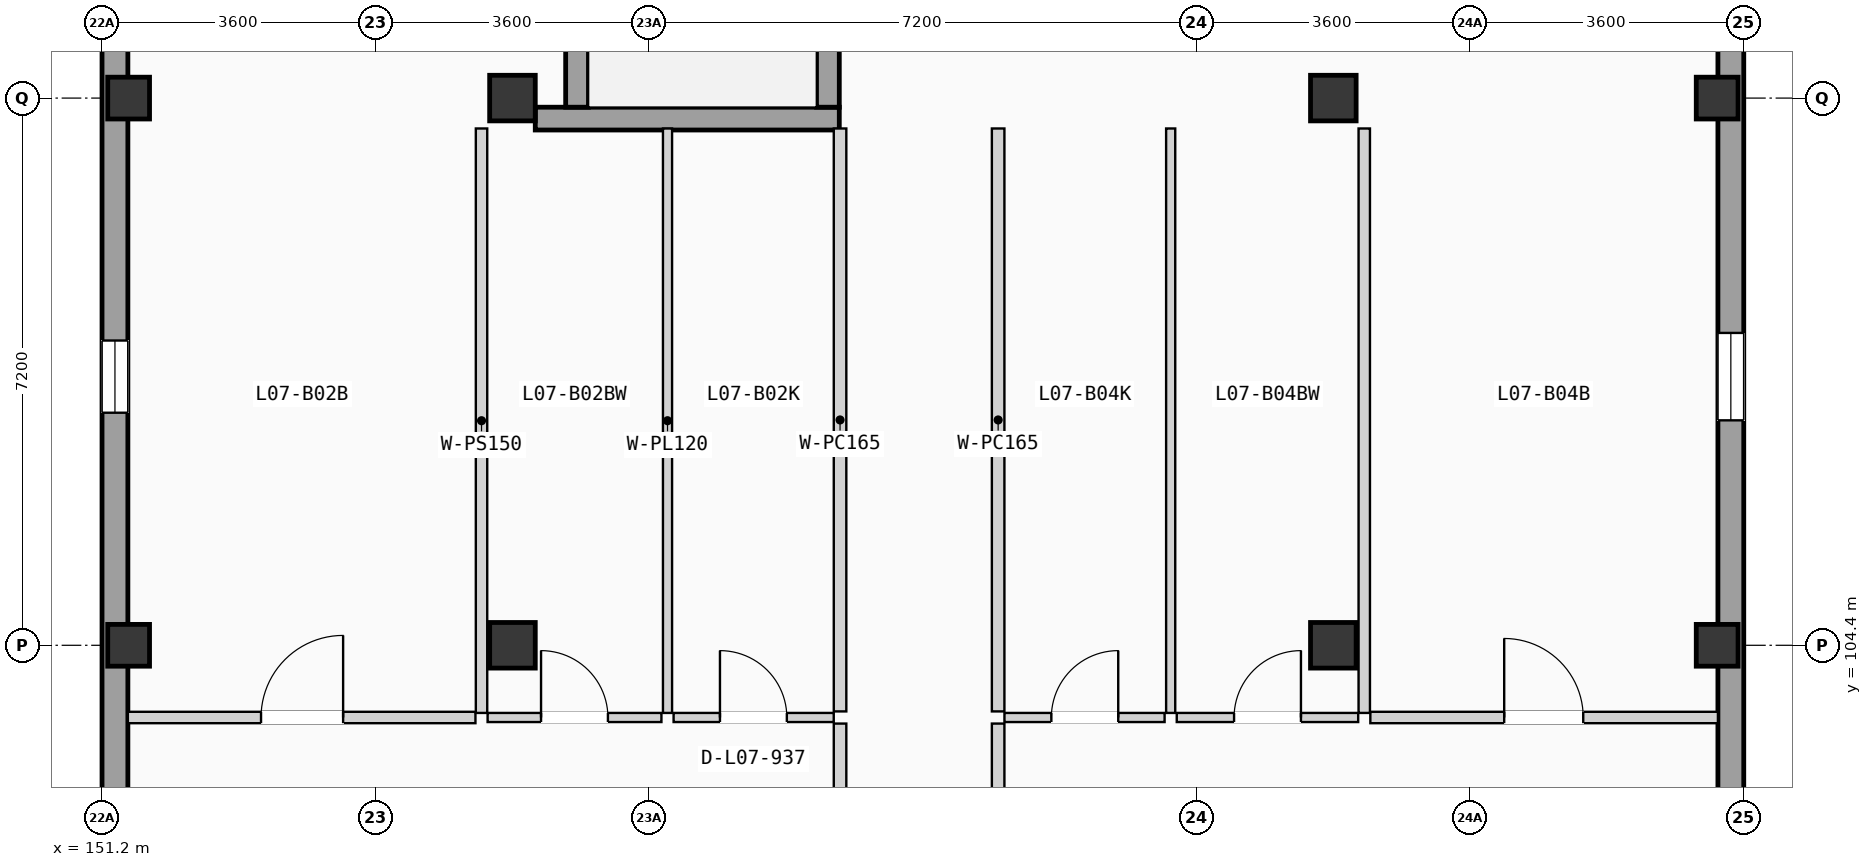
"""IFC4 building model, lengths in metres.
Left out: names, types, materials, properties, quantities, classifications, styles, units other than length and angle.
Written with IfcOpenShell. Run it as: python <this file> out.ifc"""

import sys

from ifc_helpers import new_model, si_unit, direction, frame, frame_2d, origin, origin_2d, place, context, subcontext, project, spatial, rectangle, extrude, element, fill, save


model = new_model("IFC4")
c1 = context("Model", 3, precision=1e-05, world=origin(), true_north=direction((0.0, 1.0)))
c2 = subcontext(c1, "Body", "Model", "MODEL_VIEW")
j1 = project(units=[si_unit("LENGTHUNIT", "METRE"), si_unit("PLANEANGLEUNIT", "RADIAN")], contexts=[c1])
p1 = place(None, origin())
s1 = spatial("IfcSite", under=j1, at=p1, CompositionType="ELEMENT")
p2 = place(p1, origin())
s2 = spatial("IfcBuilding", under=s1, at=p2, CompositionType="ELEMENT")
p3 = place(p2, frame((0.0, 0.0, 24.675)))
s3 = spatial("IfcBuildingStorey", under=s2, at=p3, CompositionType="ELEMENT", Elevation=24.675)
for number, where, z_axis, x_axis in (
    (1, (151.55, 104.4, 0.0), (0.0, 0.0, 1.0), (1.0, 0.0, 0.0)),
    (2, (151.55, 111.6, 0.0), (0.0, 0.0, 1.0), (1.0, 0.0, 0.0)),
):
    element("IfcColumn", number, at=place(p3, frame(where, z_axis=z_axis, x_axis=x_axis)), inside=s3, PredefinedType="COLUMN", context=c2, shape_type="SweptSolid", body=[
        extrude(rectangle(XDim=0.55, YDim=0.55, at=origin_2d()), origin(), (0.0, 0.0, 1.0), 3.15),
    ])
for number, where, z_axis, x_axis in (
    (3, (156.6, 104.4, 0.0), (0.0, 0.0, 1.0), (1.0, 0.0, 0.0)),
    (4, (156.6, 111.6, 0.0), (0.0, 0.0, 1.0), (1.0, 0.0, 0.0)),
    (5, (167.4, 104.4, 0.0), (0.0, 0.0, 1.0), (1.0, 0.0, 0.0)),
    (6, (167.4, 111.6, 0.0), (0.0, 0.0, 1.0), (1.0, 0.0, 0.0)),
):
    element("IfcColumn", number, at=place(p3, frame(where, z_axis=z_axis, x_axis=x_axis)), inside=s3, PredefinedType="COLUMN", context=c2, shape_type="SweptSolid", body=[
        extrude(rectangle(XDim=0.6, YDim=0.6, at=origin_2d()), origin(), (0.0, 0.0, 1.0), 3.15),
    ])
for number, where, z_axis, x_axis in (
    (7, (172.45, 104.4, 0.0), (0.0, 0.0, 1.0), (1.0, 0.0, 0.0)),
    (8, (172.45, 111.6, 0.0), (0.0, 0.0, 1.0), (1.0, 0.0, 0.0)),
):
    element("IfcColumn", number, at=place(p3, frame(where, z_axis=z_axis, x_axis=x_axis)), inside=s3, PredefinedType="COLUMN", context=c2, shape_type="SweptSolid", body=[
        extrude(rectangle(XDim=0.55, YDim=0.55, at=origin_2d()), origin(), (0.0, 0.0, 1.0), 3.15),
    ])
p4 = place(p3, frame((151.37, 68.74, 0.0), z_axis=(0.0, 0.0, 1.0), x_axis=(0.0, 1.0, 0.0)))
e9 = element("IfcWall", 9, at=p4, inside=s3, PredefinedType="SOLIDWALL", context=c2, shape_type="SweptSolid", body=[
    extrude(rectangle(XDim=49.72, YDim=0.34, at=frame_2d((24.86, 0.0))), origin(), (0.0, 0.0, 1.0), 2.9),
])
p5 = place(p4, frame((15.35, 0.0, 0.85)))
e10 = element("IfcOpeningElement", 10, at=p5, cuts=e9, PredefinedType="OPENING", context=c2, shape_type="SweptSolid", body=[
    extrude(rectangle(XDim=0.95, YDim=1.2, at=frame_2d((0.475, 0.6))), frame((0.0, 0.18, 0.0), z_axis=(0.0, -1.0, 0.0), x_axis=(1.0, 0.0, 0.0)), (0.0, 0.0, 1.0), 0.36),
])
p6 = place(p4, frame((9.023, 0.0, 0.9)))
e11 = element("IfcOpeningElement", 11, at=p6, cuts=e9, PredefinedType="OPENING", context=c2, shape_type="SweptSolid", body=[
    extrude(rectangle(XDim=0.95, YDim=1.2, at=frame_2d((0.475, 0.6))), frame((0.0, 0.18, 0.0), z_axis=(0.0, -1.0, 0.0), x_axis=(1.0, 0.0, 0.0)), (0.0, 0.0, 1.0), 0.36),
])
p7 = place(p4, frame((18.76, 0.0, 0.865)))
e12 = element("IfcOpeningElement", 12, at=p7, cuts=e9, PredefinedType="OPENING", context=c2, shape_type="SweptSolid", body=[
    extrude(rectangle(XDim=0.95, YDim=1.35, at=frame_2d((0.475, 0.675))), frame((0.0, 0.18, 0.0), z_axis=(0.0, -1.0, 0.0), x_axis=(1.0, 0.0, 0.0)), (0.0, 0.0, 1.0), 0.36),
])
p8 = place(p4, frame((31.585, 0.0, 0.715)))
e13 = element("IfcOpeningElement", 13, at=p8, cuts=e9, PredefinedType="OPENING", context=c2, shape_type="SweptSolid", body=[
    extrude(rectangle(XDim=0.95, YDim=1.5, at=frame_2d((0.475, 0.75))), frame((0.0, 0.18, 0.0), z_axis=(0.0, -1.0, 0.0), x_axis=(1.0, 0.0, 0.0)), (0.0, 0.0, 1.0), 0.36),
])
p9 = place(p4, frame((24.687, 0.0, 0.565)))
e14 = element("IfcOpeningElement", 14, at=p9, cuts=e9, PredefinedType="OPENING", context=c2, shape_type="SweptSolid", body=[
    extrude(rectangle(XDim=0.95, YDim=1.65, at=frame_2d((0.475, 0.825))), frame((0.0, 0.18, 0.0), z_axis=(0.0, -1.0, 0.0), x_axis=(1.0, 0.0, 0.0)), (0.0, 0.0, 1.0), 0.36),
])
p10 = place(p4, frame((38.72, 0.0, 0.85)))
e15 = element("IfcOpeningElement", 15, at=p10, cuts=e9, PredefinedType="OPENING", context=c2, shape_type="SweptSolid", body=[
    extrude(rectangle(XDim=0.95, YDim=1.2, at=frame_2d((0.475, 0.6))), frame((0.0, 0.18, 0.0), z_axis=(0.0, -1.0, 0.0), x_axis=(1.0, 0.0, 0.0)), (0.0, 0.0, 1.0), 0.36),
])
p11 = place(p3, frame((172.63, 68.74, 0.0), z_axis=(0.0, 0.0, 1.0), x_axis=(0.0, 1.0, 0.0)))
e16 = element("IfcWall", 16, at=p11, inside=s3, PredefinedType="SOLIDWALL", context=c2, shape_type="SweptSolid", body=[
    extrude(rectangle(XDim=49.72, YDim=0.34, at=frame_2d((24.86, 0.0))), origin(), (0.0, 0.0, 1.0), 2.9),
])
p12 = place(p11, frame((15.299, 0.0, 0.9)))
e17 = element("IfcOpeningElement", 17, at=p12, cuts=e16, PredefinedType="OPENING", context=c2, shape_type="SweptSolid", body=[
    extrude(rectangle(XDim=1.05, YDim=1.2, at=frame_2d((0.525, 0.6))), frame((0.0, 0.18, 0.0), z_axis=(0.0, -1.0, 0.0), x_axis=(1.0, 0.0, 0.0)), (0.0, 0.0, 1.0), 0.36),
])
p13 = place(p11, frame((8.972, 0.0, 0.865)))
e18 = element("IfcOpeningElement", 18, at=p13, cuts=e16, PredefinedType="OPENING", context=c2, shape_type="SweptSolid", body=[
    extrude(rectangle(XDim=1.05, YDim=1.35, at=frame_2d((0.525, 0.675))), frame((0.0, 0.18, 0.0), z_axis=(0.0, -1.0, 0.0), x_axis=(1.0, 0.0, 0.0)), (0.0, 0.0, 1.0), 0.36),
])
p14 = place(p11, frame((18.71, 0.0, 0.715)))
e19 = element("IfcOpeningElement", 19, at=p14, cuts=e16, PredefinedType="OPENING", context=c2, shape_type="SweptSolid", body=[
    extrude(rectangle(XDim=1.05, YDim=1.5, at=frame_2d((0.525, 0.75))), frame((0.0, 0.18, 0.0), z_axis=(0.0, -1.0, 0.0), x_axis=(1.0, 0.0, 0.0)), (0.0, 0.0, 1.0), 0.36),
])
p15 = place(p11, frame((31.535, 0.0, 0.565)))
e20 = element("IfcOpeningElement", 20, at=p15, cuts=e16, PredefinedType="OPENING", context=c2, shape_type="SweptSolid", body=[
    extrude(rectangle(XDim=1.05, YDim=1.65, at=frame_2d((0.525, 0.825))), frame((0.0, 0.18, 0.0), z_axis=(0.0, -1.0, 0.0), x_axis=(1.0, 0.0, 0.0)), (0.0, 0.0, 1.0), 0.36),
])
p16 = place(p11, frame((24.687, 0.0, 0.85)))
e21 = element("IfcOpeningElement", 21, at=p16, cuts=e16, PredefinedType="OPENING", context=c2, shape_type="SweptSolid", body=[
    extrude(rectangle(XDim=0.95, YDim=1.2, at=frame_2d((0.475, 0.6))), frame((0.0, 0.18, 0.0), z_axis=(0.0, -1.0, 0.0), x_axis=(1.0, 0.0, 0.0)), (0.0, 0.0, 1.0), 0.36),
])
p17 = place(p11, frame((38.62, 0.0, 0.9)))
e22 = element("IfcOpeningElement", 22, at=p17, cuts=e16, PredefinedType="OPENING", context=c2, shape_type="SweptSolid", body=[
    extrude(rectangle(XDim=1.15, YDim=1.2, at=frame_2d((0.575, 0.6))), frame((0.0, 0.18, 0.0), z_axis=(0.0, -1.0, 0.0), x_axis=(1.0, 0.0, 0.0)), (0.0, 0.0, 1.0), 0.36),
])
p18 = place(p3, frame((156.9, 111.33, 0.0), z_axis=(0.0, 0.0, 1.0), x_axis=(1.0, 0.0, 0.0)))
e23 = element("IfcWall", 23, at=p18, inside=s3, PredefinedType="SHEAR", context=c2, shape_type="SweptSolid", body=[
    extrude(rectangle(XDim=4.0, YDim=0.3, at=frame_2d((2.0, 0.0))), origin(), (0.0, 0.0, 1.0), 2.9),
])
p19 = place(p3, frame((157.45, 111.48, 0.0), z_axis=(0.0, 0.0, 1.0), x_axis=(0.0, 1.0, 0.0)))
e24 = element("IfcWall", 24, at=p19, inside=s3, PredefinedType="SHEAR", context=c2, shape_type="SweptSolid", body=[
    extrude(rectangle(XDim=7.0, YDim=0.3, at=frame_2d((3.5, 0.0))), origin(), (0.0, 0.0, 1.0), 2.9),
])
p20 = place(p3, frame((160.75, 111.48, 0.0), z_axis=(0.0, 0.0, 1.0), x_axis=(0.0, 1.0, 0.0)))
e25 = element("IfcWall", 25, at=p20, inside=s3, PredefinedType="SHEAR", context=c2, shape_type="SweptSolid", body=[
    extrude(rectangle(XDim=7.0, YDim=0.3, at=frame_2d((3.5, 0.0))), origin(), (0.0, 0.0, 1.0), 2.9),
])
p21 = place(p20, frame((5.625, 0.0, 0.0)))
e26 = element("IfcOpeningElement", 26, at=p21, cuts=e25, PredefinedType="OPENING", context=c2, shape_type="SweptSolid", body=[
    extrude(rectangle(XDim=1.15, YDim=2.12, at=frame_2d((0.575, 1.06))), frame((0.0, 0.16, 0.0), z_axis=(0.0, -1.0, 0.0), x_axis=(1.0, 0.0, 0.0)), (0.0, 0.0, 1.0), 0.32),
])
p22 = place(p3, frame((160.91, 98.23, 0.0), z_axis=(0.0, 0.0, 1.0), x_axis=(0.0, 1.0, 0.0)))
e27 = element("IfcWall", 27, at=p22, inside=s3, PredefinedType="PARTITIONING", context=c2, shape_type="SweptSolid", body=[
    extrude(rectangle(XDim=5.14, YDim=0.165, at=frame_2d((2.57, 0.0))), origin(), (0.0, 0.0, 1.0), 2.87),
])
p23 = place(p22, frame((2.065, 0.0, 0.0)))
e28 = element("IfcOpeningElement", 28, at=p23, cuts=e27, PredefinedType="OPENING", context=c2, shape_type="SweptSolid", body=[
    extrude(rectangle(XDim=1.01, YDim=2.11, at=frame_2d((0.505, 1.055))), frame((0.0, 0.093, 0.0), z_axis=(0.0, -1.0, 0.0), x_axis=(1.0, 0.0, 0.0)), (0.0, 0.0, 1.0), 0.185),
])
p24 = place(p3, frame((160.91, 103.53, 0.0), z_axis=(0.0, 0.0, 1.0), x_axis=(0.0, 1.0, 0.0)))
e29 = element("IfcWall", 29, at=p24, inside=s3, PredefinedType="PARTITIONING", context=c2, shape_type="SweptSolid", body=[
    extrude(rectangle(XDim=7.67, YDim=0.165, at=frame_2d((3.835, 0.0))), origin(), (0.0, 0.0, 1.0), 2.87),
])
p25 = place(p3, frame((162.99, 98.23, 0.0), z_axis=(0.0, 0.0, 1.0), x_axis=(0.0, 1.0, 0.0)))
e30 = element("IfcWall", 30, at=p25, inside=s3, PredefinedType="PARTITIONING", context=c2, shape_type="SweptSolid", body=[
    extrude(rectangle(XDim=5.14, YDim=0.165, at=frame_2d((2.57, 0.0))), origin(), (0.0, 0.0, 1.0), 2.87),
])
p26 = place(p25, frame((2.065, 0.0, 0.0)))
e31 = element("IfcOpeningElement", 31, at=p26, cuts=e30, PredefinedType="OPENING", context=c2, shape_type="SweptSolid", body=[
    extrude(rectangle(XDim=1.01, YDim=2.11, at=frame_2d((0.505, 1.055))), frame((0.0, 0.093, 0.0), z_axis=(0.0, -1.0, 0.0), x_axis=(1.0, 0.0, 0.0)), (0.0, 0.0, 1.0), 0.185),
])
p27 = place(p3, frame((162.99, 103.53, 0.0), z_axis=(0.0, 0.0, 1.0), x_axis=(0.0, 1.0, 0.0)))
e32 = element("IfcWall", 32, at=p27, inside=s3, PredefinedType="PARTITIONING", context=c2, shape_type="SweptSolid", body=[
    extrude(rectangle(XDim=7.67, YDim=0.165, at=frame_2d((3.835, 0.0))), origin(), (0.0, 0.0, 1.0), 2.87),
])
p28 = place(p3, frame((158.72, 103.45, 0.0), z_axis=(0.0, 0.0, 1.0), x_axis=(1.0, 0.0, 0.0)))
e33 = element("IfcWall", 33, at=p28, inside=s3, PredefinedType="PARTITIONING", context=c2, shape_type="SweptSolid", body=[
    extrude(rectangle(XDim=2.107, YDim=0.12, at=frame_2d((1.053, 0.0))), origin(), (0.0, 0.0, 1.0), 2.87),
])
p29 = place(p28, frame((0.61, 0.0, 0.0)))
e34 = element("IfcOpeningElement", 34, at=p29, cuts=e33, PredefinedType="OPENING", context=c2, shape_type="SweptSolid", body=[
    extrude(rectangle(XDim=0.88, YDim=2.02, at=frame_2d((0.44, 1.01))), frame((0.0, 0.07, 0.0), z_axis=(0.0, -1.0, 0.0), x_axis=(1.0, 0.0, 0.0)), (0.0, 0.0, 1.0), 0.14),
])
p30 = place(p3, frame((151.54, 103.45, 0.0), z_axis=(0.0, 0.0, 1.0), x_axis=(1.0, 0.0, 0.0)))
e35 = element("IfcWall", 35, at=p30, inside=s3, PredefinedType="PARTITIONING", context=c2, shape_type="SweptSolid", body=[
    extrude(rectangle(XDim=4.573, YDim=0.15, at=frame_2d((2.287, 0.0))), origin(), (0.0, 0.0, 1.0), 2.87),
])
p31 = place(p30, frame((1.752, 0.0, 0.0)))
e36 = element("IfcOpeningElement", 36, at=p31, cuts=e35, PredefinedType="OPENING", context=c2, shape_type="SweptSolid", body=[
    extrude(rectangle(XDim=1.08, YDim=2.1, at=frame_2d((0.54, 1.05))), frame((0.0, 0.085, 0.0), z_axis=(0.0, -1.0, 0.0), x_axis=(1.0, 0.0, 0.0)), (0.0, 0.0, 1.0), 0.17),
])
p32 = place(p3, frame((156.273, 103.45, 0.0), z_axis=(0.0, 0.0, 1.0), x_axis=(1.0, 0.0, 0.0)))
e37 = element("IfcWall", 37, at=p32, inside=s3, PredefinedType="PARTITIONING", context=c2, shape_type="SweptSolid", body=[
    extrude(rectangle(XDim=2.287, YDim=0.12, at=frame_2d((1.144, 0.0))), origin(), (0.0, 0.0, 1.0), 2.87),
])
p33 = place(p32, frame((0.703, 0.0, 0.0)))
e38 = element("IfcOpeningElement", 38, at=p33, cuts=e37, PredefinedType="OPENING", context=c2, shape_type="SweptSolid", body=[
    extrude(rectangle(XDim=0.88, YDim=2.02, at=frame_2d((0.44, 1.01))), frame((0.0, 0.07, 0.0), z_axis=(0.0, -1.0, 0.0), x_axis=(1.0, 0.0, 0.0)), (0.0, 0.0, 1.0), 0.14),
])
p34 = place(p3, frame((158.64, 103.51, 0.0), z_axis=(0.0, 0.0, 1.0), x_axis=(0.0, 1.0, 0.0)))
e39 = element("IfcWall", 39, at=p34, inside=s3, PredefinedType="PARTITIONING", context=c2, shape_type="SweptSolid", body=[
    extrude(rectangle(XDim=7.69, YDim=0.12, at=frame_2d((3.845, 0.0))), origin(), (0.0, 0.0, 1.0), 2.87),
])
p35 = place(p3, frame((156.193, 103.51, 0.0), z_axis=(0.0, 0.0, 1.0), x_axis=(0.0, 1.0, 0.0)))
e40 = element("IfcWall", 40, at=p35, inside=s3, PredefinedType="PARTITIONING", context=c2, shape_type="SweptSolid", body=[
    extrude(rectangle(XDim=7.69, YDim=0.15, at=frame_2d((3.845, 0.0))), origin(), (0.0, 0.0, 1.0), 2.87),
])
p36 = place(p3, frame((163.073, 103.45, 0.0), z_axis=(0.0, 0.0, 1.0), x_axis=(1.0, 0.0, 0.0)))
e41 = element("IfcWall", 41, at=p36, inside=s3, PredefinedType="PARTITIONING", context=c2, shape_type="SweptSolid", body=[
    extrude(rectangle(XDim=2.107, YDim=0.12, at=frame_2d((1.053, 0.0))), origin(), (0.0, 0.0, 1.0), 2.87),
])
p37 = place(p36, frame((0.617, 0.0, 0.0)))
e42 = element("IfcOpeningElement", 42, at=p37, cuts=e41, PredefinedType="OPENING", context=c2, shape_type="SweptSolid", body=[
    extrude(rectangle(XDim=0.88, YDim=2.02, at=frame_2d((0.44, 1.01))), frame((0.0, 0.07, 0.0), z_axis=(0.0, -1.0, 0.0), x_axis=(1.0, 0.0, 0.0)), (0.0, 0.0, 1.0), 0.14),
])
p38 = place(p3, frame((167.887, 103.45, 0.0), z_axis=(0.0, 0.0, 1.0), x_axis=(1.0, 0.0, 0.0)))
e43 = element("IfcWall", 43, at=p38, inside=s3, PredefinedType="PARTITIONING", context=c2, shape_type="SweptSolid", body=[
    extrude(rectangle(XDim=4.573, YDim=0.15, at=frame_2d((2.287, 0.0))), origin(), (0.0, 0.0, 1.0), 2.87),
])
p39 = place(p38, frame((1.761, 0.0, 0.0)))
e44 = element("IfcOpeningElement", 44, at=p39, cuts=e43, PredefinedType="OPENING", context=c2, shape_type="SweptSolid", body=[
    extrude(rectangle(XDim=1.04, YDim=2.08, at=frame_2d((0.52, 1.04))), frame((0.0, 0.085, 0.0), z_axis=(0.0, -1.0, 0.0), x_axis=(1.0, 0.0, 0.0)), (0.0, 0.0, 1.0), 0.17),
])
p40 = place(p3, frame((165.34, 103.45, 0.0), z_axis=(0.0, 0.0, 1.0), x_axis=(1.0, 0.0, 0.0)))
e45 = element("IfcWall", 45, at=p40, inside=s3, PredefinedType="PARTITIONING", context=c2, shape_type="SweptSolid", body=[
    extrude(rectangle(XDim=2.387, YDim=0.12, at=frame_2d((1.193, 0.0))), origin(), (0.0, 0.0, 1.0), 2.87),
])
p41 = place(p40, frame((0.754, 0.0, 0.0)))
e46 = element("IfcOpeningElement", 46, at=p41, cuts=e45, PredefinedType="OPENING", context=c2, shape_type="SweptSolid", body=[
    extrude(rectangle(XDim=0.88, YDim=2.02, at=frame_2d((0.44, 1.01))), frame((0.0, 0.07, 0.0), z_axis=(0.0, -1.0, 0.0), x_axis=(1.0, 0.0, 0.0)), (0.0, 0.0, 1.0), 0.14),
])
p42 = place(p3, frame((165.26, 103.51, 0.0), z_axis=(0.0, 0.0, 1.0), x_axis=(0.0, 1.0, 0.0)))
e47 = element("IfcWall", 47, at=p42, inside=s3, PredefinedType="PARTITIONING", context=c2, shape_type="SweptSolid", body=[
    extrude(rectangle(XDim=7.69, YDim=0.12, at=frame_2d((3.845, 0.0))), origin(), (0.0, 0.0, 1.0), 2.87),
])
p43 = place(p3, frame((167.807, 103.51, 0.0), z_axis=(0.0, 0.0, 1.0), x_axis=(0.0, 1.0, 0.0)))
e48 = element("IfcWall", 48, at=p43, inside=s3, PredefinedType="PARTITIONING", context=c2, shape_type="SweptSolid", body=[
    extrude(rectangle(XDim=7.69, YDim=0.15, at=frame_2d((3.845, 0.0))), origin(), (0.0, 0.0, 1.0), 2.87),
])
p44 = place(p10, origin())
e49 = element("IfcWindow", 49, at=p44, inside=s3, PartitioningType="SINGLE_PANEL", PredefinedType="WINDOW", context=c2, shape_type="SweptSolid", body=[
    extrude(rectangle(XDim=0.95, YDim=1.2, at=frame_2d((0.475, 0.6))), frame((0.0, 0.03, 0.0), z_axis=(0.0, -1.0, 0.0), x_axis=(1.0, 0.0, 0.0)), (0.0, 0.0, 1.0), 0.06),
])
fill(e15, e49)
p45 = place(p17, origin())
e50 = element("IfcWindow", 50, at=p45, inside=s3, PartitioningType="SINGLE_PANEL", PredefinedType="WINDOW", context=c2, shape_type="SweptSolid", body=[
    extrude(rectangle(XDim=1.15, YDim=1.2, at=frame_2d((0.575, 0.6))), frame((0.0, 0.03, 0.0), z_axis=(0.0, -1.0, 0.0), x_axis=(1.0, 0.0, 0.0)), (0.0, 0.0, 1.0), 0.06),
])
fill(e22, e50)
p46 = place(p29, origin())
e51 = element("IfcDoor", 51, at=p46, inside=s3, OperationType="SINGLE_SWING_LEFT", PredefinedType="DOOR", context=c2, shape_type="SweptSolid", body=[
    extrude(rectangle(XDim=0.88, YDim=2.02, at=frame_2d((0.44, 1.01))), frame((0.0, 0.025, 0.0), z_axis=(0.0, -1.0, 0.0), x_axis=(1.0, 0.0, 0.0)), (0.0, 0.0, 1.0), 0.05),
])
fill(e34, e51)
p47 = place(p31, origin())
e52 = element("IfcDoor", 52, at=p47, inside=s3, OperationType="SINGLE_SWING_RIGHT", PredefinedType="DOOR", context=c2, shape_type="SweptSolid", body=[
    extrude(rectangle(XDim=1.08, YDim=2.1, at=frame_2d((0.54, 1.05))), frame((0.0, 0.025, 0.0), z_axis=(0.0, -1.0, 0.0), x_axis=(1.0, 0.0, 0.0)), (0.0, 0.0, 1.0), 0.05),
])
fill(e36, e52)
p48 = place(p33, origin())
e53 = element("IfcDoor", 53, at=p48, inside=s3, OperationType="SINGLE_SWING_LEFT", PredefinedType="DOOR", context=c2, shape_type="SweptSolid", body=[
    extrude(rectangle(XDim=0.88, YDim=2.02, at=frame_2d((0.44, 1.01))), frame((0.0, 0.025, 0.0), z_axis=(0.0, -1.0, 0.0), x_axis=(1.0, 0.0, 0.0)), (0.0, 0.0, 1.0), 0.05),
])
fill(e38, e53)
p49 = place(p37, origin())
e54 = element("IfcDoor", 54, at=p49, inside=s3, OperationType="SINGLE_SWING_RIGHT", PredefinedType="DOOR", context=c2, shape_type="SweptSolid", body=[
    extrude(rectangle(XDim=0.88, YDim=2.02, at=frame_2d((0.44, 1.01))), frame((0.0, 0.025, 0.0), z_axis=(0.0, -1.0, 0.0), x_axis=(1.0, 0.0, 0.0)), (0.0, 0.0, 1.0), 0.05),
])
fill(e42, e54)
p50 = place(p39, origin())
e55 = element("IfcDoor", 55, at=p50, inside=s3, OperationType="SINGLE_SWING_LEFT", PredefinedType="DOOR", context=c2, shape_type="SweptSolid", body=[
    extrude(rectangle(XDim=1.04, YDim=2.08, at=frame_2d((0.52, 1.04))), frame((0.0, 0.025, 0.0), z_axis=(0.0, -1.0, 0.0), x_axis=(1.0, 0.0, 0.0)), (0.0, 0.0, 1.0), 0.05),
])
fill(e44, e55)
p51 = place(p41, origin())
e56 = element("IfcDoor", 56, at=p51, inside=s3, OperationType="SINGLE_SWING_RIGHT", PredefinedType="DOOR", context=c2, shape_type="SweptSolid", body=[
    extrude(rectangle(XDim=0.88, YDim=2.02, at=frame_2d((0.44, 1.01))), frame((0.0, 0.025, 0.0), z_axis=(0.0, -1.0, 0.0), x_axis=(1.0, 0.0, 0.0)), (0.0, 0.0, 1.0), 0.05),
])
fill(e46, e56)
save(model, sys.argv[1])
